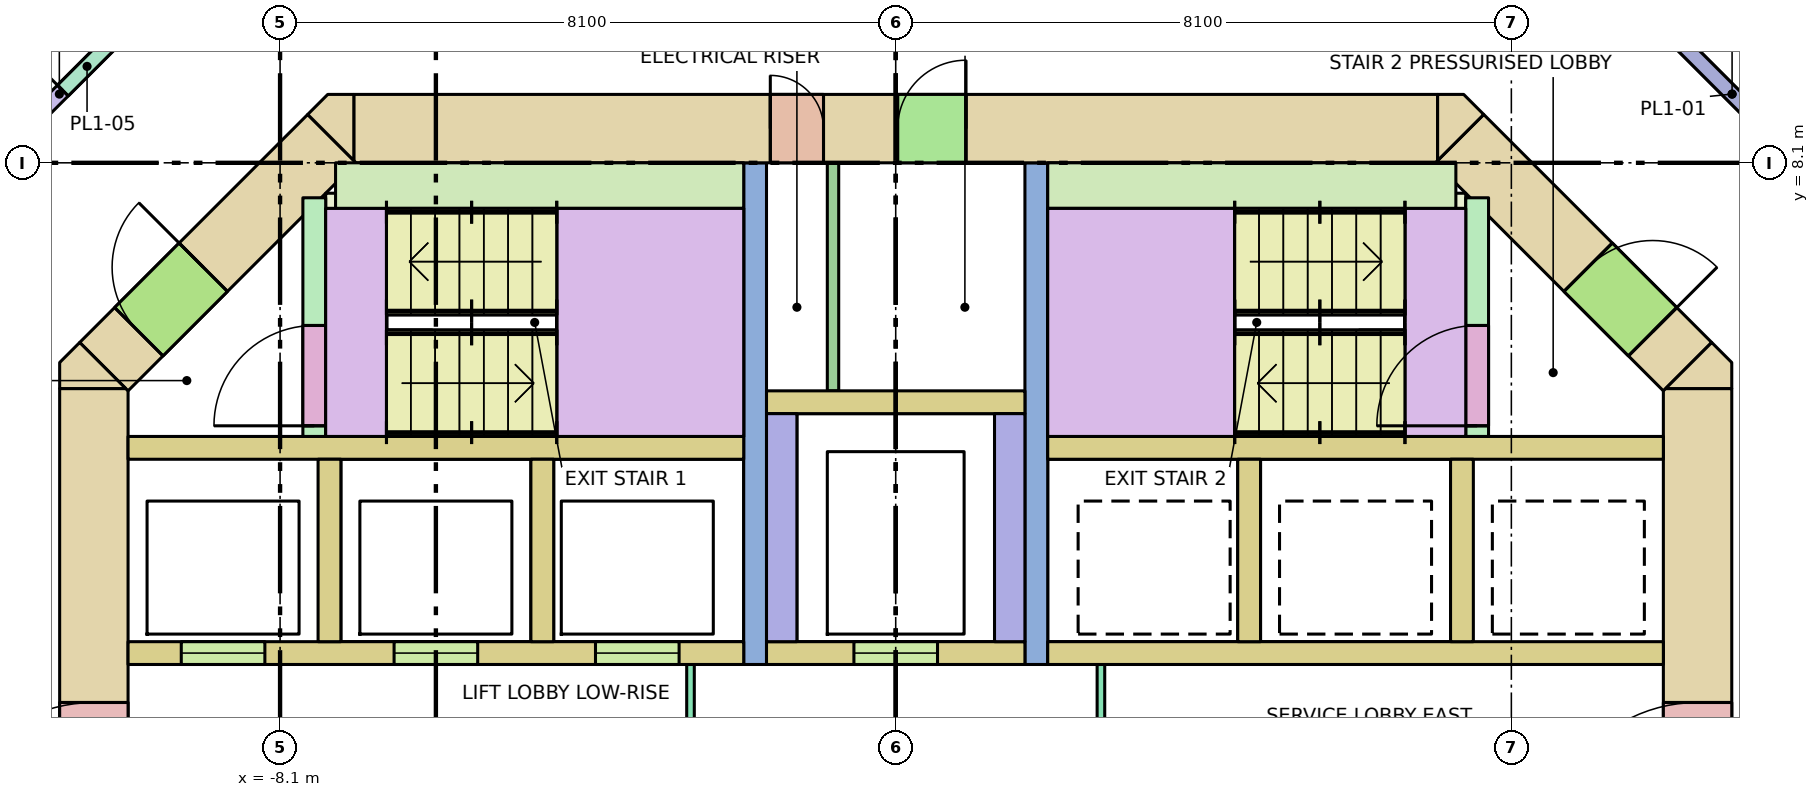
"""IFC4 building model, lengths in metres.
Left out: names, types, materials, properties, quantities, classifications, styles, units other than length and angle.
Written with IfcOpenShell. Run it as: python <this file> out.ifc"""

import sys

from ifc_helpers import new_model, si_unit, direction, frame, frame_2d, origin, place, context, subcontext, project, spatial, polyline, rectangle, outline, extrude, element, fill, save


model = new_model("IFC4")
c1 = context("Model", 3, precision=1e-05, world=origin(), true_north=direction((0.0, 1.0)))
c2 = subcontext(c1, "Body", "Model", "MODEL_VIEW")
j1 = project(units=[si_unit("LENGTHUNIT", "METRE"), si_unit("PLANEANGLEUNIT", "RADIAN")], contexts=[c1])
p1 = place(None, origin())
s1 = spatial("IfcSite", under=j1, at=p1, CompositionType="ELEMENT")
p2 = place(p1, origin())
s2 = spatial("IfcBuilding", under=s1, at=p2, CompositionType="ELEMENT")
p3 = place(p2, frame((0.0, 0.0, 110.6)))
s3 = spatial("IfcBuildingStorey", under=s2, at=p3, CompositionType="ELEMENT", Elevation=110.6)
p4 = place(p3, frame((-7.13, 8.55, -0.28), z_axis=(0.0, 0.0, 1.0), x_axis=(1.0, 0.0, 0.0)))
e1 = element("IfcWall", 1, at=p4, inside=s3, PredefinedType="SHEAR", context=c2, shape_type="SweptSolid", body=[
    extrude(rectangle(XDim=14.26, YDim=0.9, at=frame_2d((7.13, 0.0))), origin(), (0.0, 0.0, 1.0), 5.6),
])
p5 = place(p4, frame((5.48, 0.0, 0.28)))
e2 = element("IfcOpeningElement", 2, at=p5, cuts=e1, PredefinedType="OPENING", context=c2, shape_type="SweptSolid", body=[
    extrude(rectangle(XDim=0.7, YDim=2.1, at=frame_2d((0.35, 1.05))), frame((0.0, 0.46, 0.0), z_axis=(0.0, -1.0, 0.0), x_axis=(1.0, 0.0, 0.0)), (0.0, 0.0, 1.0), 0.92),
])
p6 = place(p4, frame((7.155, 0.0, 0.28)))
e3 = element("IfcOpeningElement", 3, at=p6, cuts=e1, PredefinedType="OPENING", context=c2, shape_type="SweptSolid", body=[
    extrude(rectangle(XDim=0.9, YDim=2.1, at=frame_2d((0.45, 1.05))), frame((0.0, 0.46, 0.0), z_axis=(0.0, -1.0, 0.0), x_axis=(1.0, 0.0, 0.0)), (0.0, 0.0, 1.0), 0.92),
])
p7 = place(p3, frame((-10.55, -5.13, -0.28), z_axis=(0.0, 0.0, 1.0), x_axis=(0.0, 1.0, 0.0)))
e4 = element("IfcWall", 4, at=p7, inside=s3, PredefinedType="SHEAR", context=c2, shape_type="SweptSolid", body=[
    extrude(rectangle(XDim=10.26, YDim=0.9, at=frame_2d((5.13, 0.0))), origin(), (0.0, 0.0, 1.0), 5.6),
])
p8 = place(p7, frame((4.13, 0.0, 0.28)))
e5 = element("IfcOpeningElement", 5, at=p8, cuts=e4, PredefinedType="OPENING", context=c2, shape_type="SweptSolid", body=[
    extrude(rectangle(XDim=2.0, YDim=2.1, at=frame_2d((1.0, 1.05))), frame((0.0, 0.46, 0.0), z_axis=(0.0, -1.0, 0.0), x_axis=(1.0, 0.0, 0.0)), (0.0, 0.0, 1.0), 0.92),
])
p9 = place(p3, frame((10.55, -5.13, -0.28), z_axis=(0.0, 0.0, 1.0), x_axis=(0.0, 1.0, 0.0)))
e6 = element("IfcWall", 6, at=p9, inside=s3, PredefinedType="SHEAR", context=c2, shape_type="SweptSolid", body=[
    extrude(rectangle(XDim=10.26, YDim=0.9, at=frame_2d((5.13, 0.0))), origin(), (0.0, 0.0, 1.0), 5.6),
])
p10 = place(p9, frame((4.13, 0.0, 0.28)))
e7 = element("IfcOpeningElement", 7, at=p10, cuts=e6, PredefinedType="OPENING", context=c2, shape_type="SweptSolid", body=[
    extrude(rectangle(XDim=2.0, YDim=2.1, at=frame_2d((1.0, 1.05))), frame((0.0, 0.46, 0.0), z_axis=(0.0, -1.0, 0.0), x_axis=(1.0, 0.0, 0.0)), (0.0, 0.0, 1.0), 0.92),
])
p11 = place(p3, frame((-10.418, 5.418, -0.28), z_axis=(0.0, 0.0, 1.0), x_axis=(0.707106781187, 0.707106781187, 0.0)))
e8 = element("IfcWall", 8, at=p11, inside=s3, PredefinedType="SHEAR", context=c2, shape_type="SweptSolid", body=[
    extrude(rectangle(XDim=4.243, YDim=0.9, at=frame_2d((2.121, 0.0))), origin(), (0.0, 0.0, 1.0), 5.6),
])
p12 = place(p11, frame((0.65, 0.0, 0.28)))
e9 = element("IfcOpeningElement", 9, at=p12, cuts=e8, PredefinedType="OPENING", context=c2, shape_type="SweptSolid", body=[
    extrude(rectangle(XDim=1.2, YDim=2.1, at=frame_2d((0.6, 1.05))), frame((0.0, 0.46, 0.0), z_axis=(0.0, -1.0, 0.0), x_axis=(1.0, 0.0, 0.0)), (0.0, 0.0, 1.0), 0.92),
])
p13 = place(p3, frame((7.418, 8.418, -0.28), z_axis=(0.0, 0.0, 1.0), x_axis=(0.707106781187, -0.707106781187, 0.0)))
e10 = element("IfcWall", 10, at=p13, inside=s3, PredefinedType="SHEAR", context=c2, shape_type="SweptSolid", body=[
    extrude(rectangle(XDim=4.243, YDim=0.9, at=frame_2d((2.121, 0.0))), origin(), (0.0, 0.0, 1.0), 5.6),
])
p14 = place(p13, frame((2.393, 0.0, 0.28)))
e11 = element("IfcOpeningElement", 11, at=p14, cuts=e10, PredefinedType="OPENING", context=c2, shape_type="SweptSolid", body=[
    extrude(rectangle(XDim=1.2, YDim=2.1, at=frame_2d((0.6, 1.05))), frame((0.0, 0.46, 0.0), z_axis=(0.0, -1.0, 0.0), x_axis=(1.0, 0.0, 0.0)), (0.0, 0.0, 1.0), 0.92),
])
p15 = place(p3, frame((0.0, 0.0, -0.28)))
e12 = element("IfcWall", 12, at=p15, inside=s3, PredefinedType="SHEAR", context=c2, shape_type="SweptSolid", body=[
    extrude(outline(polyline([(-10.736, 5.736), (-10.13, 5.13), (-11.0, 5.13), (-11.0, 5.473), (-10.736, 5.736)])), origin(), (0.0, 0.0, 1.0), 5.6),
])
p16 = place(p3, frame((0.0, 0.0, -0.28)))
e13 = element("IfcWall", 13, at=p16, inside=s3, PredefinedType="SHEAR", context=c2, shape_type="SweptSolid", body=[
    extrude(outline(polyline([(11.0, 5.473), (11.0, 5.13), (10.13, 5.13), (10.736, 5.736), (11.0, 5.473)])), origin(), (0.0, 0.0, 1.0), 5.6),
])
p17 = place(p3, frame((0.0, 0.0, -0.28)))
e14 = element("IfcWall", 14, at=p17, inside=s3, PredefinedType="SHEAR", context=c2, shape_type="SweptSolid", body=[
    extrude(outline(polyline([(-7.473, 9.0), (-7.13, 9.0), (-7.13, 8.13), (-7.736, 8.736), (-7.473, 9.0)])), origin(), (0.0, 0.0, 1.0), 5.6),
])
p18 = place(p3, frame((0.0, 0.0, -0.28)))
e15 = element("IfcWall", 15, at=p18, inside=s3, PredefinedType="SHEAR", context=c2, shape_type="SweptSolid", body=[
    extrude(outline(polyline([(7.473, 9.0), (7.736, 8.736), (7.13, 8.13), (7.13, 9.0), (7.473, 9.0)])), origin(), (0.0, 0.0, 1.0), 5.6),
])
for number, where, z_axis, x_axis in (
    (16, (-10.1, 4.35, 0.0), (0.0, 0.0, 1.0), (1.0, 0.0, 0.0)),
    (17, (2.0, 4.35, 0.0), (0.0, 0.0, 1.0), (1.0, 0.0, 0.0)),
):
    element("IfcWall", number, at=place(p3, frame(where, z_axis=z_axis, x_axis=x_axis)), inside=s3, PredefinedType="SOLIDWALL", context=c2, shape_type="SweptSolid", body=[
        extrude(rectangle(XDim=8.1, YDim=0.3, at=frame_2d((4.05, 0.0))), origin(), (0.0, 0.0, 1.0), 5.32),
    ])
p19 = place(p3, frame((-10.1, 1.65, 0.0), z_axis=(0.0, 0.0, 1.0), x_axis=(1.0, 0.0, 0.0)))
e18 = element("IfcWall", 18, at=p19, inside=s3, PredefinedType="SOLIDWALL", context=c2, shape_type="SweptSolid", body=[
    extrude(rectangle(XDim=8.1, YDim=0.3, at=frame_2d((4.05, 0.0))), origin(), (0.0, 0.0, 1.0), 5.32),
])
p20 = place(p19, frame((0.7, 0.0, 0.0)))
e19 = element("IfcOpeningElement", 19, at=p20, cuts=e18, PredefinedType="OPENING", context=c2, shape_type="SweptSolid", body=[
    extrude(rectangle(XDim=1.1, YDim=2.1, at=frame_2d((0.55, 1.05))), frame((0.0, 0.16, 0.0), z_axis=(0.0, -1.0, 0.0), x_axis=(1.0, 0.0, 0.0)), (0.0, 0.0, 1.0), 0.32),
])
p21 = place(p19, frame((3.5, 0.0, 0.0)))
e20 = element("IfcOpeningElement", 20, at=p21, cuts=e18, PredefinedType="OPENING", context=c2, shape_type="SweptSolid", body=[
    extrude(rectangle(XDim=1.1, YDim=2.1, at=frame_2d((0.55, 1.05))), frame((0.0, 0.16, 0.0), z_axis=(0.0, -1.0, 0.0), x_axis=(1.0, 0.0, 0.0)), (0.0, 0.0, 1.0), 0.32),
])
p22 = place(p19, frame((6.15, 0.0, 0.0)))
e21 = element("IfcOpeningElement", 21, at=p22, cuts=e18, PredefinedType="OPENING", context=c2, shape_type="SweptSolid", body=[
    extrude(rectangle(XDim=1.1, YDim=2.1, at=frame_2d((0.55, 1.05))), frame((0.0, 0.16, 0.0), z_axis=(0.0, -1.0, 0.0), x_axis=(1.0, 0.0, 0.0)), (0.0, 0.0, 1.0), 0.32),
])
p23 = place(p3, frame((2.0, 1.65, 0.0), z_axis=(0.0, 0.0, 1.0), x_axis=(1.0, 0.0, 0.0)))
e22 = element("IfcWall", 22, at=p23, inside=s3, PredefinedType="SOLIDWALL", context=c2, shape_type="SweptSolid", body=[
    extrude(rectangle(XDim=8.1, YDim=0.3, at=frame_2d((4.05, 0.0))), origin(), (0.0, 0.0, 1.0), 5.32),
])
for number, where, z_axis, x_axis in (
    (23, (-7.45, 1.8, 0.0), (0.0, 0.0, 1.0), (0.0, 1.0, 0.0)),
    (24, (-4.65, 1.8, 0.0), (0.0, 0.0, 1.0), (0.0, 1.0, 0.0)),
    (25, (4.65, 1.8, 0.0), (0.0, 0.0, 1.0), (0.0, 1.0, 0.0)),
    (26, (7.45, 1.8, 0.0), (0.0, 0.0, 1.0), (0.0, 1.0, 0.0)),
):
    element("IfcWall", number, at=place(p3, frame(where, z_axis=z_axis, x_axis=x_axis)), inside=s3, PredefinedType="SOLIDWALL", context=c2, shape_type="SweptSolid", body=[
        extrude(rectangle(XDim=2.4, YDim=0.3, at=frame_2d((1.2, 0.0))), origin(), (0.0, 0.0, 1.0), 5.32),
    ])
for number, where, z_axis, x_axis in (
    (27, (-1.85, 1.5, 0.0), (0.0, 0.0, 1.0), (0.0, 1.0, 0.0)),
    (28, (1.85, 1.5, 0.0), (0.0, 0.0, 1.0), (0.0, 1.0, 0.0)),
):
    element("IfcWall", number, at=place(p3, frame(where, z_axis=z_axis, x_axis=x_axis)), inside=s3, PredefinedType="SHEAR", context=c2, shape_type="SweptSolid", body=[
        extrude(rectangle(XDim=6.6, YDim=0.3, at=frame_2d((3.3, 0.0))), origin(), (0.0, 0.0, 1.0), 5.32),
    ])
p24 = place(p3, frame((-1.7, 1.65, 0.0), z_axis=(0.0, 0.0, 1.0), x_axis=(1.0, 0.0, 0.0)))
e29 = element("IfcWall", 29, at=p24, inside=s3, PredefinedType="SOLIDWALL", context=c2, shape_type="SweptSolid", body=[
    extrude(rectangle(XDim=3.4, YDim=0.3, at=frame_2d((1.7, 0.0))), origin(), (0.0, 0.0, 1.0), 5.32),
])
p25 = place(p24, frame((1.15, 0.0, 0.0)))
e30 = element("IfcOpeningElement", 30, at=p25, cuts=e29, PredefinedType="OPENING", context=c2, shape_type="SweptSolid", body=[
    extrude(rectangle(XDim=1.1, YDim=2.1, at=frame_2d((0.55, 1.05))), frame((0.0, 0.16, 0.0), z_axis=(0.0, -1.0, 0.0), x_axis=(1.0, 0.0, 0.0)), (0.0, 0.0, 1.0), 0.32),
])
for number, where, z_axis, x_axis in (
    (31, (-1.5, 1.8, 0.0), (0.0, 0.0, 1.0), (0.0, 1.0, 0.0)),
    (32, (1.5, 1.8, 0.0), (0.0, 0.0, 1.0), (0.0, 1.0, 0.0)),
):
    element("IfcWall", number, at=place(p3, frame(where, z_axis=z_axis, x_axis=x_axis)), inside=s3, PredefinedType="SOLIDWALL", context=c2, shape_type="SweptSolid", body=[
        extrude(rectangle(XDim=3.0, YDim=0.4, at=frame_2d((1.5, 0.0))), origin(), (0.0, 0.0, 1.0), 5.32),
    ])
p26 = place(p3, frame((-1.7, 4.95, 0.0), z_axis=(0.0, 0.0, 1.0), x_axis=(1.0, 0.0, 0.0)))
e33 = element("IfcWall", 33, at=p26, inside=s3, PredefinedType="SOLIDWALL", context=c2, shape_type="SweptSolid", body=[
    extrude(rectangle(XDim=3.4, YDim=0.3, at=frame_2d((1.7, 0.0))), origin(), (0.0, 0.0, 1.0), 5.32),
])
p27 = place(p3, frame((-7.65, 4.5, 0.0), z_axis=(0.0, 0.0, 1.0), x_axis=(0.0, 1.0, 0.0)))
e34 = element("IfcWall", 34, at=p27, inside=s3, PredefinedType="SHEAR", context=c2, shape_type="SweptSolid", body=[
    extrude(rectangle(XDim=3.14, YDim=0.3, at=frame_2d((1.57, 0.0))), origin(), (0.0, 0.0, 1.0), 5.32),
])
p28 = place(p27, frame((0.14, 0.0, 0.0)))
e35 = element("IfcOpeningElement", 35, at=p28, cuts=e34, PredefinedType="OPENING", context=c2, shape_type="SweptSolid", body=[
    extrude(rectangle(XDim=1.32, YDim=2.1, at=frame_2d((0.66, 1.05))), frame((0.0, 0.16, 0.0), z_axis=(0.0, -1.0, 0.0), x_axis=(1.0, 0.0, 0.0)), (0.0, 0.0, 1.0), 0.32),
])
p29 = place(p3, frame((-7.37, 7.8, 0.0), z_axis=(0.0, 0.0, 1.0), x_axis=(1.0, 0.0, 0.0)))
e36 = element("IfcWall", 36, at=p29, inside=s3, PredefinedType="SHEAR", context=c2, shape_type="SweptSolid", body=[
    extrude(rectangle(XDim=5.37, YDim=0.6, at=frame_2d((2.685, 0.0))), origin(), (0.0, 0.0, 1.0), 5.32),
])
p30 = place(p3, frame((7.65, 4.5, 0.0), z_axis=(0.0, 0.0, 1.0), x_axis=(0.0, 1.0, 0.0)))
e37 = element("IfcWall", 37, at=p30, inside=s3, PredefinedType="SHEAR", context=c2, shape_type="SweptSolid", body=[
    extrude(rectangle(XDim=3.14, YDim=0.3, at=frame_2d((1.57, 0.0))), origin(), (0.0, 0.0, 1.0), 5.32),
])
p31 = place(p30, frame((0.14, 0.0, 0.0)))
e38 = element("IfcOpeningElement", 38, at=p31, cuts=e37, PredefinedType="OPENING", context=c2, shape_type="SweptSolid", body=[
    extrude(rectangle(XDim=1.32, YDim=2.1, at=frame_2d((0.66, 1.05))), frame((0.0, 0.16, 0.0), z_axis=(0.0, -1.0, 0.0), x_axis=(1.0, 0.0, 0.0)), (0.0, 0.0, 1.0), 0.32),
])
p32 = place(p3, frame((2.0, 7.8, 0.0), z_axis=(0.0, 0.0, 1.0), x_axis=(1.0, 0.0, 0.0)))
e39 = element("IfcWall", 39, at=p32, inside=s3, PredefinedType="SHEAR", context=c2, shape_type="SweptSolid", body=[
    extrude(rectangle(XDim=5.37, YDim=0.6, at=frame_2d((2.685, 0.0))), origin(), (0.0, 0.0, 1.0), 5.32),
])
for number, where, z_axis, x_axis in (
    (40, (-7.5, 7.6, 0.0), (0.0, 0.0, 1.0), (1.0, 0.0, 0.0)),
    (41, (6.9, 7.6, 0.0), (0.0, 0.0, 1.0), (1.0, 0.0, 0.0)),
):
    element("IfcWall", number, at=place(p3, frame(where, z_axis=z_axis, x_axis=x_axis)), inside=s3, PredefinedType="SHEAR", context=c2, shape_type="SweptSolid", body=[
        extrude(rectangle(XDim=0.6, YDim=0.2, at=frame_2d((0.3, 0.0))), origin(), (0.0, 0.0, 1.0), 5.32),
    ])
p33 = place(p3, frame((-2.7, -1.5, 0.0), z_axis=(0.0, 0.0, 1.0), x_axis=(0.0, 1.0, 0.0)))
e42 = element("IfcWall", 42, at=p33, inside=s3, PredefinedType="PARTITIONING", context=c2, shape_type="SweptSolid", body=[
    extrude(rectangle(XDim=3.0, YDim=0.1, at=frame_2d((1.5, 0.0))), origin(), (0.0, 0.0, 1.0), 5.32),
])
p34 = place(p33, frame((0.9, 0.0, 0.0)))
e43 = element("IfcOpeningElement", 43, at=p34, cuts=e42, PredefinedType="OPENING", context=c2, shape_type="SweptSolid", body=[
    extrude(rectangle(XDim=1.2, YDim=2.1, at=frame_2d((0.6, 1.05))), frame((0.0, 0.06, 0.0), z_axis=(0.0, -1.0, 0.0), x_axis=(1.0, 0.0, 0.0)), (0.0, 0.0, 1.0), 0.12),
])
p35 = place(p3, frame((2.7, -1.5, 0.0), z_axis=(0.0, 0.0, 1.0), x_axis=(0.0, 1.0, 0.0)))
e44 = element("IfcWall", 44, at=p35, inside=s3, PredefinedType="PARTITIONING", context=c2, shape_type="SweptSolid", body=[
    extrude(rectangle(XDim=3.0, YDim=0.1, at=frame_2d((1.5, 0.0))), origin(), (0.0, 0.0, 1.0), 5.32),
])
p36 = place(p35, frame((0.9, 0.0, 0.0)))
e45 = element("IfcOpeningElement", 45, at=p36, cuts=e44, PredefinedType="OPENING", context=c2, shape_type="SweptSolid", body=[
    extrude(rectangle(XDim=1.2, YDim=2.1, at=frame_2d((0.6, 1.05))), frame((0.0, 0.06, 0.0), z_axis=(0.0, -1.0, 0.0), x_axis=(1.0, 0.0, 0.0)), (0.0, 0.0, 1.0), 0.12),
])
p37 = place(p3, frame((-0.825, 5.1, 0.0), z_axis=(0.0, 0.0, 1.0), x_axis=(0.0, 1.0, 0.0)))
e46 = element("IfcWall", 46, at=p37, inside=s3, PredefinedType="PARTITIONING", context=c2, shape_type="SweptSolid", body=[
    extrude(rectangle(XDim=3.0, YDim=0.15, at=frame_2d((1.5, 0.0))), origin(), (0.0, 0.0, 1.0), 5.32),
])
p38 = place(p3, frame((-13.45, 6.558, 0.0), z_axis=(0.0, 0.0, 1.0), x_axis=(0.707106781187, 0.707106781187, 0.0)))
e47 = element("IfcWall", 47, at=p38, inside=s3, PredefinedType="PARTITIONING", context=c2, shape_type="SweptSolid", body=[
    extrude(rectangle(XDim=6.919, YDim=0.2, at=frame_2d((3.459, 0.0))), origin(), (0.0, 0.0, 1.0), 4.47),
])
p39 = place(p38, frame((3.525, 0.0, 0.0)))
e48 = element("IfcOpeningElement", 48, at=p39, cuts=e47, PredefinedType="OPENING", context=c2, shape_type="SweptSolid", body=[
    extrude(rectangle(XDim=0.9, YDim=2.1, at=frame_2d((0.45, 1.05))), frame((0.0, 0.11, 0.0), z_axis=(0.0, -1.0, 0.0), x_axis=(1.0, 0.0, 0.0)), (0.0, 0.0, 1.0), 0.22),
])
p40 = place(p3, frame((8.558, 11.45, 0.0), z_axis=(0.0, 0.0, 1.0), x_axis=(0.707106781187, -0.707106781187, 0.0)))
e49 = element("IfcWall", 49, at=p40, inside=s3, PredefinedType="PARTITIONING", context=c2, shape_type="SweptSolid", body=[
    extrude(rectangle(XDim=6.919, YDim=0.2, at=frame_2d((3.459, 0.0))), origin(), (0.0, 0.0, 1.0), 4.47),
])
p41 = place(p40, frame((2.56, 0.0, 0.0)))
e50 = element("IfcOpeningElement", 50, at=p41, cuts=e49, PredefinedType="OPENING", context=c2, shape_type="SweptSolid", body=[
    extrude(rectangle(XDim=1.8, YDim=2.1, at=frame_2d((0.9, 1.05))), frame((0.0, 0.11, 0.0), z_axis=(0.0, -1.0, 0.0), x_axis=(1.0, 0.0, 0.0)), (0.0, 0.0, 1.0), 0.22),
])
p42 = place(p20, origin())
e51 = element("IfcDoor", 51, at=p42, inside=s3, OperationType="DOUBLE_DOOR_SLIDING", PredefinedType="DOOR", context=c2, shape_type="SweptSolid", body=[
    extrude(rectangle(XDim=1.1, YDim=2.1, at=frame_2d((0.55, 1.05))), frame((0.0, 0.025, 0.0), z_axis=(0.0, -1.0, 0.0), x_axis=(1.0, 0.0, 0.0)), (0.0, 0.0, 1.0), 0.05),
])
fill(e19, e51)
p43 = place(p21, origin())
e52 = element("IfcDoor", 52, at=p43, inside=s3, OperationType="DOUBLE_DOOR_SLIDING", PredefinedType="DOOR", context=c2, shape_type="SweptSolid", body=[
    extrude(rectangle(XDim=1.1, YDim=2.1, at=frame_2d((0.55, 1.05))), frame((0.0, 0.025, 0.0), z_axis=(0.0, -1.0, 0.0), x_axis=(1.0, 0.0, 0.0)), (0.0, 0.0, 1.0), 0.05),
])
fill(e20, e52)
p44 = place(p22, origin())
e53 = element("IfcDoor", 53, at=p44, inside=s3, OperationType="DOUBLE_DOOR_SLIDING", PredefinedType="DOOR", context=c2, shape_type="SweptSolid", body=[
    extrude(rectangle(XDim=1.1, YDim=2.1, at=frame_2d((0.55, 1.05))), frame((0.0, 0.025, 0.0), z_axis=(0.0, -1.0, 0.0), x_axis=(1.0, 0.0, 0.0)), (0.0, 0.0, 1.0), 0.05),
])
fill(e21, e53)
p45 = place(p25, origin())
e54 = element("IfcDoor", 54, at=p45, inside=s3, OperationType="DOUBLE_DOOR_SLIDING", PredefinedType="DOOR", context=c2, shape_type="SweptSolid", body=[
    extrude(rectangle(XDim=1.1, YDim=2.1, at=frame_2d((0.55, 1.05))), frame((0.0, 0.025, 0.0), z_axis=(0.0, -1.0, 0.0), x_axis=(1.0, 0.0, 0.0)), (0.0, 0.0, 1.0), 0.05),
])
fill(e30, e54)
p46 = place(p28, origin())
e55 = element("IfcDoor", 55, at=p46, inside=s3, OperationType="DOUBLE_DOOR_SINGLE_SWING", PredefinedType="DOOR", context=c2, shape_type="SweptSolid", body=[
    extrude(rectangle(XDim=1.32, YDim=2.1, at=frame_2d((0.66, 1.05))), frame((0.0, 0.025, 0.0), z_axis=(0.0, -1.0, 0.0), x_axis=(1.0, 0.0, 0.0)), (0.0, 0.0, 1.0), 0.05),
])
fill(e35, e55)
p47 = place(p12, origin())
e56 = element("IfcDoor", 56, at=p47, inside=s3, OperationType="SINGLE_SWING_RIGHT", PredefinedType="DOOR", context=c2, shape_type="SweptSolid", body=[
    extrude(rectangle(XDim=1.2, YDim=2.1, at=frame_2d((0.6, 1.05))), frame((0.0, 0.025, 0.0), z_axis=(0.0, -1.0, 0.0), x_axis=(1.0, 0.0, 0.0)), (0.0, 0.0, 1.0), 0.05),
])
fill(e9, e56)
p48 = place(p31, origin())
e57 = element("IfcDoor", 57, at=p48, inside=s3, OperationType="DOUBLE_DOOR_SINGLE_SWING", PredefinedType="DOOR", context=c2, shape_type="SweptSolid", body=[
    extrude(rectangle(XDim=1.32, YDim=2.1, at=frame_2d((0.66, 1.05))), frame((0.0, 0.025, 0.0), z_axis=(0.0, -1.0, 0.0), x_axis=(1.0, 0.0, 0.0)), (0.0, 0.0, 1.0), 0.05),
])
fill(e38, e57)
p49 = place(p14, origin())
e58 = element("IfcDoor", 58, at=p49, inside=s3, OperationType="SINGLE_SWING_RIGHT", PredefinedType="DOOR", context=c2, shape_type="SweptSolid", body=[
    extrude(rectangle(XDim=1.2, YDim=2.1, at=frame_2d((0.6, 1.05))), frame((0.0, 0.025, 0.0), z_axis=(0.0, -1.0, 0.0), x_axis=(1.0, 0.0, 0.0)), (0.0, 0.0, 1.0), 0.05),
])
fill(e11, e58)
p50 = place(p8, origin())
e59 = element("IfcDoor", 59, at=p50, inside=s3, OperationType="DOUBLE_DOOR_SINGLE_SWING", PredefinedType="DOOR", context=c2, shape_type="SweptSolid", body=[
    extrude(rectangle(XDim=2.0, YDim=2.1, at=frame_2d((1.0, 1.05))), frame((0.0, 0.025, 0.0), z_axis=(0.0, -1.0, 0.0), x_axis=(1.0, 0.0, 0.0)), (0.0, 0.0, 1.0), 0.05),
])
fill(e5, e59)
p51 = place(p10, origin())
e60 = element("IfcDoor", 60, at=p51, inside=s3, OperationType="DOUBLE_DOOR_SINGLE_SWING", PredefinedType="DOOR", context=c2, shape_type="SweptSolid", body=[
    extrude(rectangle(XDim=2.0, YDim=2.1, at=frame_2d((1.0, 1.05))), frame((0.0, 0.025, 0.0), z_axis=(0.0, -1.0, 0.0), x_axis=(1.0, 0.0, 0.0)), (0.0, 0.0, 1.0), 0.05),
])
fill(e7, e60)
p52 = place(p5, origin())
e61 = element("IfcDoor", 61, at=p52, inside=s3, OperationType="SINGLE_SWING_LEFT", PredefinedType="DOOR", context=c2, shape_type="SweptSolid", body=[
    extrude(rectangle(XDim=0.7, YDim=2.1, at=frame_2d((0.35, 1.05))), frame((0.0, 0.025, 0.0), z_axis=(0.0, -1.0, 0.0), x_axis=(1.0, 0.0, 0.0)), (0.0, 0.0, 1.0), 0.05),
])
fill(e2, e61)
p53 = place(p6, origin())
e62 = element("IfcDoor", 62, at=p53, inside=s3, OperationType="SINGLE_SWING_RIGHT", PredefinedType="DOOR", context=c2, shape_type="SweptSolid", body=[
    extrude(rectangle(XDim=0.9, YDim=2.1, at=frame_2d((0.45, 1.05))), frame((0.0, 0.025, 0.0), z_axis=(0.0, -1.0, 0.0), x_axis=(1.0, 0.0, 0.0)), (0.0, 0.0, 1.0), 0.05),
])
fill(e3, e62)
p54 = place(p41, origin())
e63 = element("IfcDoor", 63, at=p54, inside=s3, OperationType="DOUBLE_DOOR_SINGLE_SWING", PredefinedType="DOOR", context=c2, shape_type="SweptSolid", body=[
    extrude(rectangle(XDim=1.8, YDim=2.1, at=frame_2d((0.9, 1.05))), frame((0.0, 0.025, 0.0), z_axis=(0.0, -1.0, 0.0), x_axis=(1.0, 0.0, 0.0)), (0.0, 0.0, 1.0), 0.05),
])
fill(e50, e63)
p55 = place(p39, origin())
e64 = element("IfcDoor", 64, at=p55, inside=s3, OperationType="SINGLE_SWING_LEFT", PredefinedType="DOOR", context=c2, shape_type="SweptSolid", body=[
    extrude(rectangle(XDim=0.9, YDim=2.1, at=frame_2d((0.45, 1.05))), frame((0.0, 0.025, 0.0), z_axis=(0.0, -1.0, 0.0), x_axis=(1.0, 0.0, 0.0)), (0.0, 0.0, 1.0), 0.05),
])
fill(e48, e64)
save(model, sys.argv[1])
